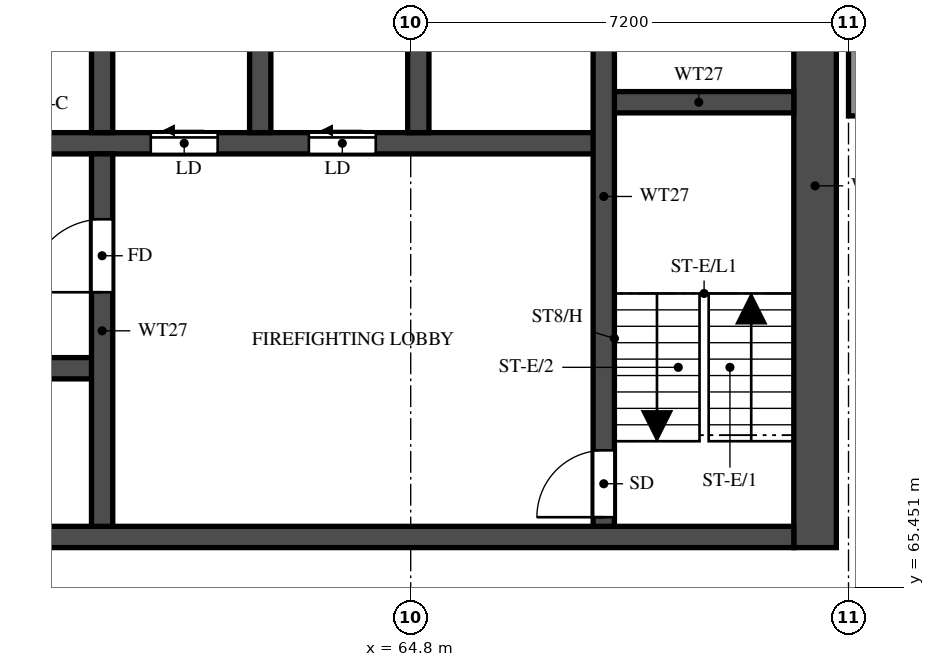
"""IFC4 building model, lengths in metres.
Left out: names, types, materials, properties, quantities, classifications, styles, units other than length and angle.
Written with IfcOpenShell. Run it as: python <this file> out.ifc"""

import sys

from ifc_helpers import new_model, si_unit, direction, frame, frame_2d, origin, place, context, subcontext, project, spatial, rectangle, extrude, element, fill, save


model = new_model("IFC4")
c1 = context("Model", 3, precision=1e-05, world=origin(), true_north=direction((0.0, 1.0)))
c2 = subcontext(c1, "Body", "Model", "MODEL_VIEW")
j1 = project(units=[si_unit("LENGTHUNIT", "METRE"), si_unit("PLANEANGLEUNIT", "RADIAN")], contexts=[c1])
p1 = place(None, origin())
s1 = spatial("IfcSite", under=j1, at=p1, CompositionType="ELEMENT")
p2 = place(p1, origin())
s2 = spatial("IfcBuilding", under=s1, at=p2, CompositionType="ELEMENT")
p3 = place(p2, frame((0.0, 0.0, 127.0)))
s3 = spatial("IfcBuildingStorey", under=s2, at=p3, CompositionType="ELEMENT", Elevation=127.0)
p4 = place(p3, frame((71.45, 66.1, 0.0), z_axis=(0.0, 0.0, 1.0), x_axis=(0.0, 1.0, 0.0)))
e1 = element("IfcWall", 1, at=p4, inside=s3, PredefinedType="SHEAR", context=c2, shape_type="SweptSolid", body=[
    extrude(rectangle(XDim=11.9, YDim=0.7, at=frame_2d((5.95, 0.0))), origin(), (0.0, 0.0, 1.0), 3.2),
])
p5 = place(p3, frame((29.7, 66.275, 0.0), z_axis=(0.0, 0.0, 1.0), x_axis=(1.0, 0.0, 0.0)))
e2 = element("IfcWall", 2, at=p5, inside=s3, PredefinedType="SHEAR", context=c2, shape_type="SweptSolid", body=[
    extrude(rectangle(XDim=41.4, YDim=0.35, at=frame_2d((20.7, 0.0))), origin(), (0.0, 0.0, 1.0), 3.2),
])
p6 = place(p5, frame((0.925, 0.0, 0.0)))
e3 = element("IfcOpeningElement", 3, at=p6, cuts=e2, PredefinedType="OPENING", context=c2, shape_type="SweptSolid", body=[
    extrude(rectangle(XDim=1.1, YDim=2.1, at=frame_2d((0.55, 1.05))), frame((0.0, 0.185, 0.0), z_axis=(0.0, -1.0, 0.0), x_axis=(1.0, 0.0, 0.0)), (0.0, 0.0, 1.0), 0.37),
])
p7 = place(p5, frame((3.712, 0.0, 0.0)))
e4 = element("IfcOpeningElement", 4, at=p7, cuts=e2, PredefinedType="OPENING", context=c2, shape_type="SweptSolid", body=[
    extrude(rectangle(XDim=1.8, YDim=2.1, at=frame_2d((0.9, 1.05))), frame((0.0, 0.185, 0.0), z_axis=(0.0, -1.0, 0.0), x_axis=(1.0, 0.0, 0.0)), (0.0, 0.0, 1.0), 0.37),
])
p8 = place(p3, frame((35.625, 69.05, 0.0), z_axis=(0.0, 0.0, 1.0), x_axis=(1.0, 0.0, 0.0)))
e5 = element("IfcWall", 5, at=p8, inside=s3, PredefinedType="SHEAR", context=c2, shape_type="SweptSolid", body=[
    extrude(rectangle(XDim=24.1, YDim=0.35, at=frame_2d((12.05, 0.0))), origin(), (0.0, 0.0, 1.0), 3.2),
])
p9 = place(p8, frame((1.0, 0.0, 0.0)))
e6 = element("IfcOpeningElement", 6, at=p9, cuts=e5, PredefinedType="OPENING", context=c2, shape_type="SweptSolid", body=[
    extrude(rectangle(XDim=1.1, YDim=2.1, at=frame_2d((0.55, 1.05))), frame((0.0, 0.185, 0.0), z_axis=(0.0, -1.0, 0.0), x_axis=(1.0, 0.0, 0.0)), (0.0, 0.0, 1.0), 0.37),
])
p10 = place(p8, frame((3.75, 0.0, 0.0)))
e7 = element("IfcOpeningElement", 7, at=p10, cuts=e5, PredefinedType="OPENING", context=c2, shape_type="SweptSolid", body=[
    extrude(rectangle(XDim=1.1, YDim=2.1, at=frame_2d((0.55, 1.05))), frame((0.0, 0.185, 0.0), z_axis=(0.0, -1.0, 0.0), x_axis=(1.0, 0.0, 0.0)), (0.0, 0.0, 1.0), 0.37),
])
p11 = place(p8, frame((6.5, 0.0, 0.0)))
e8 = element("IfcOpeningElement", 8, at=p11, cuts=e5, PredefinedType="OPENING", context=c2, shape_type="SweptSolid", body=[
    extrude(rectangle(XDim=1.1, YDim=2.1, at=frame_2d((0.55, 1.05))), frame((0.0, 0.185, 0.0), z_axis=(0.0, -1.0, 0.0), x_axis=(1.0, 0.0, 0.0)), (0.0, 0.0, 1.0), 0.37),
])
p12 = place(p8, frame((9.25, 0.0, 0.0)))
e9 = element("IfcOpeningElement", 9, at=p12, cuts=e5, PredefinedType="OPENING", context=c2, shape_type="SweptSolid", body=[
    extrude(rectangle(XDim=1.1, YDim=2.1, at=frame_2d((0.55, 1.05))), frame((0.0, 0.185, 0.0), z_axis=(0.0, -1.0, 0.0), x_axis=(1.0, 0.0, 0.0)), (0.0, 0.0, 1.0), 0.37),
])
p13 = place(p8, frame((12.0, 0.0, 0.0)))
e10 = element("IfcOpeningElement", 10, at=p13, cuts=e5, PredefinedType="OPENING", context=c2, shape_type="SweptSolid", body=[
    extrude(rectangle(XDim=1.1, YDim=2.1, at=frame_2d((0.55, 1.05))), frame((0.0, 0.185, 0.0), z_axis=(0.0, -1.0, 0.0), x_axis=(1.0, 0.0, 0.0)), (0.0, 0.0, 1.0), 0.37),
])
p14 = place(p8, frame((14.75, 0.0, 0.0)))
e11 = element("IfcOpeningElement", 11, at=p14, cuts=e5, PredefinedType="OPENING", context=c2, shape_type="SweptSolid", body=[
    extrude(rectangle(XDim=1.1, YDim=2.1, at=frame_2d((0.55, 1.05))), frame((0.0, 0.185, 0.0), z_axis=(0.0, -1.0, 0.0), x_axis=(1.0, 0.0, 0.0)), (0.0, 0.0, 1.0), 0.37),
])
p15 = place(p3, frame((32.825, 72.75, 0.0), z_axis=(0.0, 0.0, 1.0), x_axis=(1.0, 0.0, 0.0)))
e12 = element("IfcWall", 12, at=p15, inside=s3, PredefinedType="SHEAR", context=c2, shape_type="SweptSolid", body=[
    extrude(rectangle(XDim=35.15, YDim=0.35, at=frame_2d((17.575, 0.0))), origin(), (0.0, 0.0, 1.0), 3.2),
])
p16 = place(p15, frame((19.8, 0.0, 0.0)))
e13 = element("IfcOpeningElement", 13, at=p16, cuts=e12, PredefinedType="OPENING", context=c2, shape_type="SweptSolid", body=[
    extrude(rectangle(XDim=1.1, YDim=2.1, at=frame_2d((0.55, 1.05))), frame((0.0, 0.185, 0.0), z_axis=(0.0, -1.0, 0.0), x_axis=(1.0, 0.0, 0.0)), (0.0, 0.0, 1.0), 0.37),
])
p17 = place(p15, frame((27.7, 0.0, 0.0)))
e14 = element("IfcOpeningElement", 14, at=p17, cuts=e12, PredefinedType="OPENING", context=c2, shape_type="SweptSolid", body=[
    extrude(rectangle(XDim=1.1, YDim=2.1, at=frame_2d((0.55, 1.05))), frame((0.0, 0.185, 0.0), z_axis=(0.0, -1.0, 0.0), x_axis=(1.0, 0.0, 0.0)), (0.0, 0.0, 1.0), 0.37),
])
p18 = place(p15, frame((30.3, 0.0, 0.0)))
e15 = element("IfcOpeningElement", 15, at=p18, cuts=e12, PredefinedType="OPENING", context=c2, shape_type="SweptSolid", body=[
    extrude(rectangle(XDim=1.1, YDim=2.1, at=frame_2d((0.55, 1.05))), frame((0.0, 0.185, 0.0), z_axis=(0.0, -1.0, 0.0), x_axis=(1.0, 0.0, 0.0)), (0.0, 0.0, 1.0), 0.37),
])
p19 = place(p15, frame((3.8, 0.0, 0.0)))
e16 = element("IfcOpeningElement", 16, at=p19, cuts=e12, PredefinedType="OPENING", context=c2, shape_type="SweptSolid", body=[
    extrude(rectangle(XDim=1.1, YDim=2.1, at=frame_2d((0.55, 1.05))), frame((0.0, 0.185, 0.0), z_axis=(0.0, -1.0, 0.0), x_axis=(1.0, 0.0, 0.0)), (0.0, 0.0, 1.0), 0.37),
])
p20 = place(p15, frame((6.55, 0.0, 0.0)))
e17 = element("IfcOpeningElement", 17, at=p20, cuts=e12, PredefinedType="OPENING", context=c2, shape_type="SweptSolid", body=[
    extrude(rectangle(XDim=1.1, YDim=2.1, at=frame_2d((0.55, 1.05))), frame((0.0, 0.185, 0.0), z_axis=(0.0, -1.0, 0.0), x_axis=(1.0, 0.0, 0.0)), (0.0, 0.0, 1.0), 0.37),
])
p21 = place(p15, frame((9.3, 0.0, 0.0)))
e18 = element("IfcOpeningElement", 18, at=p21, cuts=e12, PredefinedType="OPENING", context=c2, shape_type="SweptSolid", body=[
    extrude(rectangle(XDim=1.1, YDim=2.1, at=frame_2d((0.55, 1.05))), frame((0.0, 0.185, 0.0), z_axis=(0.0, -1.0, 0.0), x_axis=(1.0, 0.0, 0.0)), (0.0, 0.0, 1.0), 0.37),
])
p22 = place(p15, frame((12.05, 0.0, 0.0)))
e19 = element("IfcOpeningElement", 19, at=p22, cuts=e12, PredefinedType="OPENING", context=c2, shape_type="SweptSolid", body=[
    extrude(rectangle(XDim=1.1, YDim=2.1, at=frame_2d((0.55, 1.05))), frame((0.0, 0.185, 0.0), z_axis=(0.0, -1.0, 0.0), x_axis=(1.0, 0.0, 0.0)), (0.0, 0.0, 1.0), 0.37),
])
p23 = place(p15, frame((14.8, 0.0, 0.0)))
e20 = element("IfcOpeningElement", 20, at=p23, cuts=e12, PredefinedType="OPENING", context=c2, shape_type="SweptSolid", body=[
    extrude(rectangle(XDim=1.1, YDim=2.1, at=frame_2d((0.55, 1.05))), frame((0.0, 0.185, 0.0), z_axis=(0.0, -1.0, 0.0), x_axis=(1.0, 0.0, 0.0)), (0.0, 0.0, 1.0), 0.37),
])
p24 = place(p15, frame((17.55, 0.0, 0.0)))
e21 = element("IfcOpeningElement", 21, at=p24, cuts=e12, PredefinedType="OPENING", context=c2, shape_type="SweptSolid", body=[
    extrude(rectangle(XDim=1.1, YDim=2.1, at=frame_2d((0.55, 1.05))), frame((0.0, 0.185, 0.0), z_axis=(0.0, -1.0, 0.0), x_axis=(1.0, 0.0, 0.0)), (0.0, 0.0, 1.0), 0.37),
])
p25 = place(p15, frame((0.938, 0.0, 0.0)))
e22 = element("IfcOpeningElement", 22, at=p25, cuts=e12, PredefinedType="OPENING", context=c2, shape_type="SweptSolid", body=[
    extrude(rectangle(XDim=1.1, YDim=2.1, at=frame_2d((0.55, 1.05))), frame((0.0, 0.185, 0.0), z_axis=(0.0, -1.0, 0.0), x_axis=(1.0, 0.0, 0.0)), (0.0, 0.0, 1.0), 0.37),
])
p26 = place(p3, frame((67.975, 73.425, 0.0), z_axis=(0.0, 0.0, 1.0), x_axis=(1.0, 0.0, 0.0)))
e23 = element("IfcWall", 23, at=p26, inside=s3, PredefinedType="SHEAR", context=c2, shape_type="SweptSolid", body=[
    extrude(rectangle(XDim=3.125, YDim=0.35, at=frame_2d((1.562, 0.0))), origin(), (0.0, 0.0, 1.0), 3.2),
])
p27 = place(p3, frame((67.975, 66.45, 0.0), z_axis=(0.0, 0.0, 1.0), x_axis=(0.0, 1.0, 0.0)))
e24 = element("IfcWall", 24, at=p27, inside=s3, PredefinedType="SHEAR", context=c2, shape_type="SweptSolid", body=[
    extrude(rectangle(XDim=10.85, YDim=0.35, at=frame_2d((5.425, 0.0))), origin(), (0.0, 0.0, 1.0), 3.2),
])
p28 = place(p27, frame((0.15, 0.0, 0.0)))
e25 = element("IfcOpeningElement", 25, at=p28, cuts=e24, PredefinedType="OPENING", context=c2, shape_type="SweptSolid", body=[
    extrude(rectangle(XDim=1.1, YDim=2.1, at=frame_2d((0.55, 1.05))), frame((0.0, 0.185, 0.0), z_axis=(0.0, -1.0, 0.0), x_axis=(1.0, 0.0, 0.0)), (0.0, 0.0, 1.0), 0.37),
])
p29 = place(p3, frame((59.725, 66.45, 0.0), z_axis=(0.0, 0.0, 1.0), x_axis=(0.0, 1.0, 0.0)))
e26 = element("IfcWall", 26, at=p29, inside=s3, PredefinedType="SHEAR", context=c2, shape_type="SweptSolid", body=[
    extrude(rectangle(XDim=6.125, YDim=0.35, at=frame_2d((3.062, 0.0))), origin(), (0.0, 0.0, 1.0), 3.2),
])
p30 = place(p29, frame((3.85, 0.0, 0.0)))
e27 = element("IfcOpeningElement", 27, at=p30, cuts=e26, PredefinedType="OPENING", context=c2, shape_type="SweptSolid", body=[
    extrude(rectangle(XDim=1.2, YDim=2.1, at=frame_2d((0.6, 1.05))), frame((0.0, 0.185, 0.0), z_axis=(0.0, -1.0, 0.0), x_axis=(1.0, 0.0, 0.0)), (0.0, 0.0, 1.0), 0.37),
])
for number, where, z_axis, x_axis in (
    (28, (59.725, 72.925, 0.0), (0.0, 0.0, 1.0), (0.0, 1.0, 0.0)),
    (29, (62.325, 72.925, 0.0), (0.0, 0.0, 1.0), (0.0, 1.0, 0.0)),
    (30, (64.925, 72.925, 0.0), (0.0, 0.0, 1.0), (0.0, 1.0, 0.0)),
):
    element("IfcWall", number, at=place(p3, frame(where, z_axis=z_axis, x_axis=x_axis)), inside=s3, PredefinedType="SHEAR", context=c2, shape_type="SweptSolid", body=[
        extrude(rectangle(XDim=2.95, YDim=0.35, at=frame_2d((1.475, 0.0))), origin(), (0.0, 0.0, 1.0), 3.2),
    ])
p31 = place(p3, frame((72.1, 73.2, 0.0), z_axis=(0.0, 0.0, 1.0), x_axis=(0.0, 1.0, 0.0)))
e31 = element("IfcWall", 31, at=p31, inside=s3, PredefinedType="SOLIDWALL", context=c2, shape_type="SweptSolid", body=[
    extrude(rectangle(XDim=4.8, YDim=0.2, at=frame_2d((2.4, 0.0))), origin(), (0.0, 0.0, 1.0), 3.2),
])
p32 = place(p28, origin())
e32 = element("IfcDoor", 32, at=p32, inside=s3, OperationType="SINGLE_SWING_LEFT", PredefinedType="DOOR", context=c2, shape_type="SweptSolid", body=[
    extrude(rectangle(XDim=1.1, YDim=2.1, at=frame_2d((0.55, 1.05))), frame((0.0, 0.025, 0.0), z_axis=(0.0, -1.0, 0.0), x_axis=(1.0, 0.0, 0.0)), (0.0, 0.0, 1.0), 0.05),
])
fill(e25, e32)
p33 = place(p30, origin())
e33 = element("IfcDoor", 33, at=p33, inside=s3, OperationType="SINGLE_SWING_LEFT", PredefinedType="DOOR", context=c2, shape_type="SweptSolid", body=[
    extrude(rectangle(XDim=1.2, YDim=2.1, at=frame_2d((0.6, 1.05))), frame((0.0, 0.025, 0.0), z_axis=(0.0, -1.0, 0.0), x_axis=(1.0, 0.0, 0.0)), (0.0, 0.0, 1.0), 0.05),
])
fill(e27, e33)
p34 = place(p17, origin())
e34 = element("IfcDoor", 34, at=p34, inside=s3, OperationType="SLIDING_TO_LEFT", PredefinedType="DOOR", context=c2, shape_type="SweptSolid", body=[
    extrude(rectangle(XDim=1.1, YDim=2.1, at=frame_2d((0.55, 1.05))), frame((0.0, 0.025, 0.0), z_axis=(0.0, -1.0, 0.0), x_axis=(1.0, 0.0, 0.0)), (0.0, 0.0, 1.0), 0.05),
])
fill(e14, e34)
p35 = place(p18, origin())
e35 = element("IfcDoor", 35, at=p35, inside=s3, OperationType="SLIDING_TO_LEFT", PredefinedType="DOOR", context=c2, shape_type="SweptSolid", body=[
    extrude(rectangle(XDim=1.1, YDim=2.1, at=frame_2d((0.55, 1.05))), frame((0.0, 0.025, 0.0), z_axis=(0.0, -1.0, 0.0), x_axis=(1.0, 0.0, 0.0)), (0.0, 0.0, 1.0), 0.05),
])
fill(e15, e35)
save(model, sys.argv[1])
